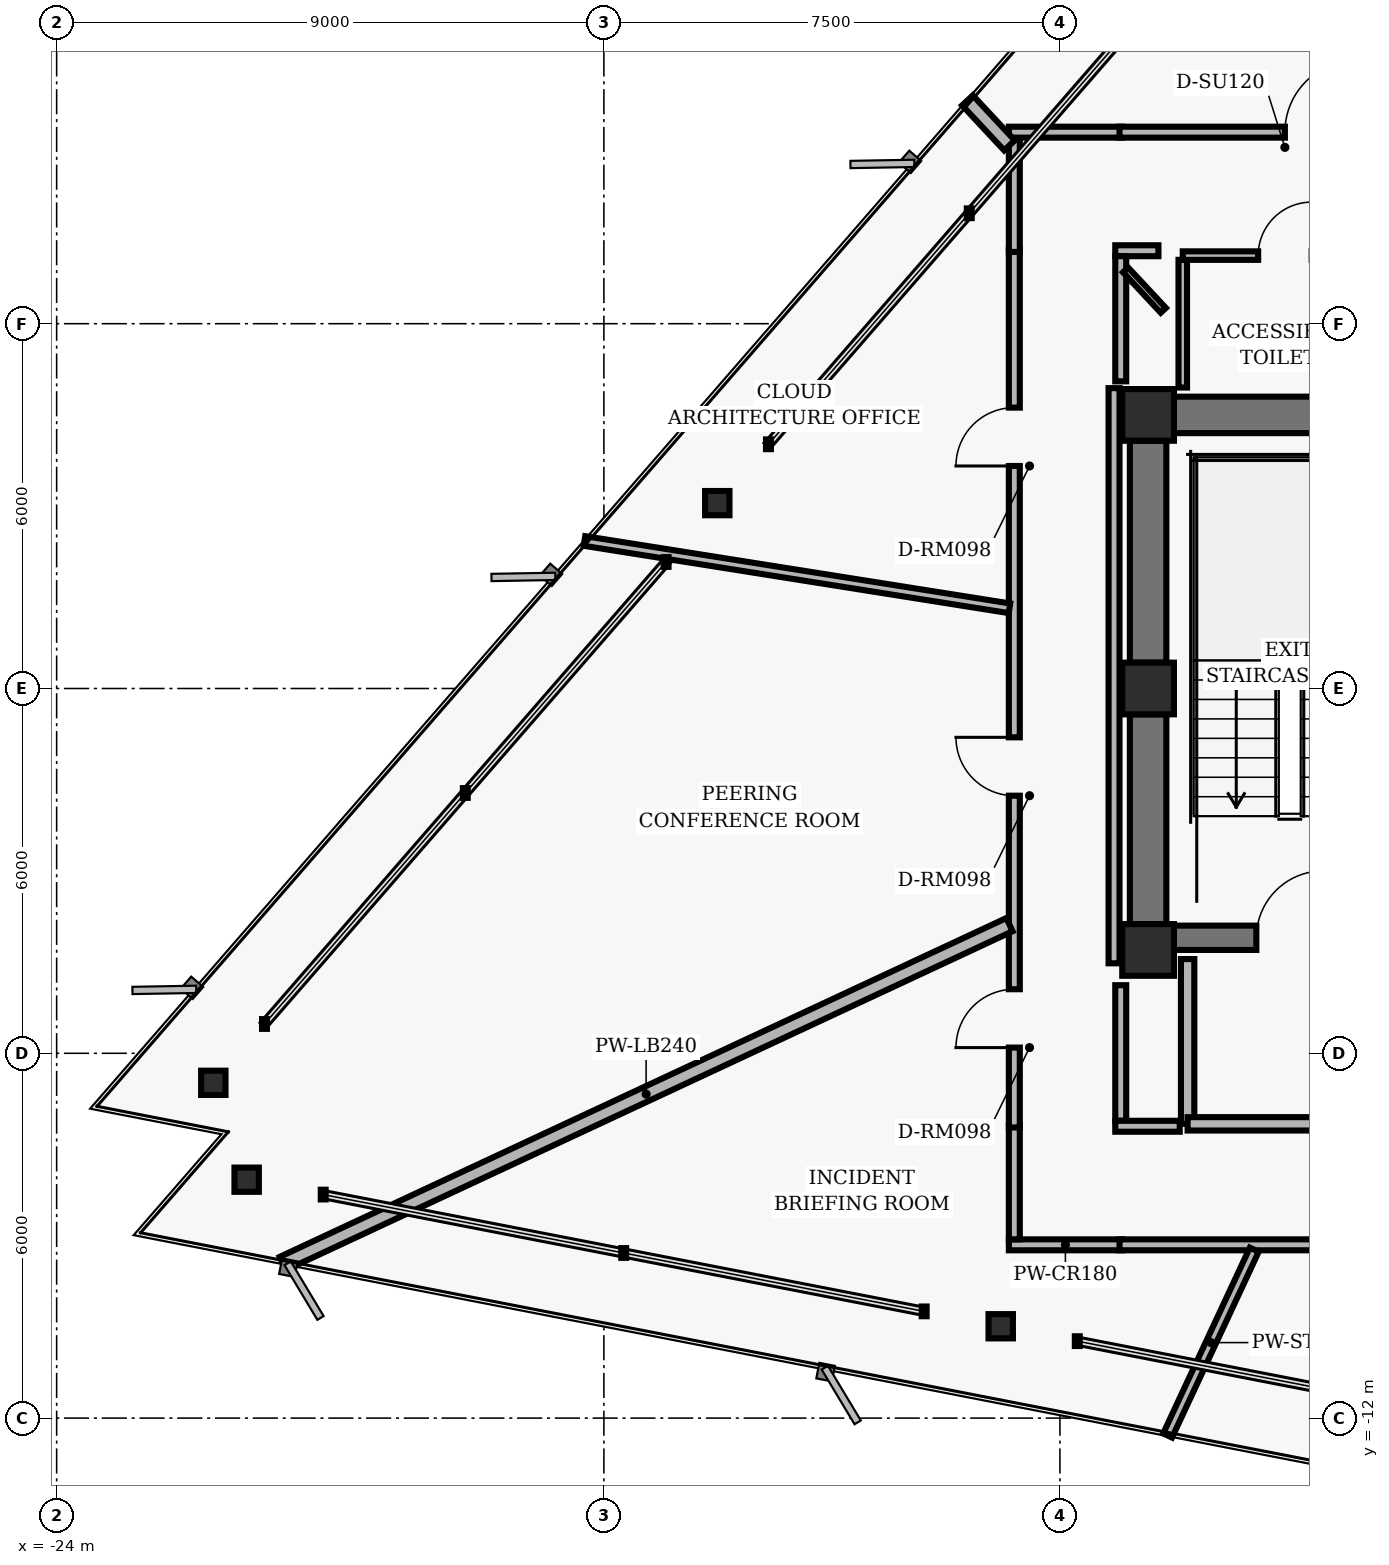
"""IFC4 building model, lengths in metres.
Left out: names, types, materials, properties, quantities, classifications, styles, units other than length and angle.
Written with IfcOpenShell. Run it as: python <this file> out.ifc"""

import sys

from ifc_helpers import new_model, si_unit, direction, frame, frame_2d, origin, origin_2d, place, context, subcontext, project, spatial, rectangle, hollow_rectangle, i_section, extrude, element, fill, save


model = new_model("IFC4")
c1 = context("Model", 3, precision=1e-05, world=origin(), true_north=direction((0.0, 1.0)))
c2 = subcontext(c1, "Body", "Model", "MODEL_VIEW")
j1 = project(units=[si_unit("LENGTHUNIT", "METRE"), si_unit("PLANEANGLEUNIT", "RADIAN")], contexts=[c1])
p1 = place(None, origin())
s1 = spatial("IfcSite", under=j1, at=p1, CompositionType="ELEMENT")
p2 = place(p1, origin())
s2 = spatial("IfcBuilding", under=s1, at=p2, CompositionType="ELEMENT")
p3 = place(p2, frame((0.0, 0.0, 156.32)))
s3 = spatial("IfcBuildingStorey", under=s2, at=p3, CompositionType="ELEMENT", Elevation=156.32)
for number, where, z_axis, x_axis in (
    (1, (-6.05, 4.5, 0.0), (0.0, 0.0, 1.0), (1.0, 0.0, 0.0)),
    (2, (-6.05, 0.0, 0.0), (0.0, 0.0, 1.0), (1.0, 0.0, 0.0)),
    (3, (-6.05, -4.3, 0.0), (0.0, 0.0, 1.0), (1.0, 0.0, 0.0)),
):
    element("IfcColumn", number, at=place(p3, frame(where, z_axis=z_axis, x_axis=x_axis)), inside=s3, PredefinedType="COLUMN", context=c2, shape_type="SweptSolid", body=[
        extrude(hollow_rectangle(XDim=0.85, YDim=0.85, WallThickness=0.055, InnerFilletRadius=0.02, OuterFilletRadius=0.04, at=origin_2d()), origin(), (0.0, 0.0, 1.0), 3.04),
    ])
p4 = place(p3, frame((-6.05, 0.425, 0.0), z_axis=(0.0, 0.0, 1.0), x_axis=(0.0, 1.0, 0.0)))
e4 = element("IfcWall", 4, at=p4, inside=s3, PredefinedType="SHEAR", context=c2, shape_type="SweptSolid", body=[
    extrude(rectangle(XDim=3.65, YDim=0.6, at=frame_2d((1.825, 0.0))), origin(), (0.0, 0.0, 1.0), 2.788),
])
p5 = place(p3, frame((-6.05, -3.875, 0.0), z_axis=(0.0, 0.0, 1.0), x_axis=(0.0, 1.0, 0.0)))
e5 = element("IfcWall", 5, at=p5, inside=s3, PredefinedType="SHEAR", context=c2, shape_type="SweptSolid", body=[
    extrude(rectangle(XDim=3.45, YDim=0.6, at=frame_2d((1.725, 0.0))), origin(), (0.0, 0.0, 1.0), 2.788),
])
p6 = place(p3, frame((-5.625, -4.1, 0.0), z_axis=(0.0, 0.0, 1.0), x_axis=(1.0, 0.0, 0.0)))
e6 = element("IfcWall", 6, at=p6, inside=s3, PredefinedType="SHEAR", context=c2, shape_type="SweptSolid", body=[
    extrude(rectangle(XDim=11.25, YDim=0.4, at=frame_2d((5.625, 0.0))), origin(), (0.0, 0.0, 1.0), 2.788),
])
p7 = place(p6, frame((1.355, 0.0, 0.0)))
e7 = element("IfcOpeningElement", 7, at=p7, cuts=e6, PredefinedType="OPENING", context=c2, shape_type="SweptSolid", body=[
    extrude(rectangle(XDim=1.1, YDim=2.04, at=frame_2d((0.55, 1.02))), frame((0.0, 0.21, 0.0), z_axis=(0.0, -1.0, 0.0), x_axis=(1.0, 0.0, 0.0)), (0.0, 0.0, 1.0), 0.42),
])
p8 = place(p6, frame((8.795, 0.0, 0.0)))
e8 = element("IfcOpeningElement", 8, at=p8, cuts=e6, PredefinedType="OPENING", context=c2, shape_type="SweptSolid", body=[
    extrude(rectangle(XDim=1.1, YDim=2.04, at=frame_2d((0.55, 1.02))), frame((0.0, 0.21, 0.0), z_axis=(0.0, -1.0, 0.0), x_axis=(1.0, 0.0, 0.0)), (0.0, 0.0, 1.0), 0.42),
])
p9 = place(p6, frame((4.095, 0.0, 0.0)))
e9 = element("IfcOpeningElement", 9, at=p9, cuts=e6, PredefinedType="OPENING", context=c2, shape_type="SweptSolid", body=[
    extrude(rectangle(XDim=1.06, YDim=2.04, at=frame_2d((0.53, 1.02))), frame((0.0, 0.21, 0.0), z_axis=(0.0, -1.0, 0.0), x_axis=(1.0, 0.0, 0.0)), (0.0, 0.0, 1.0), 0.42),
])
p10 = place(p6, frame((6.095, 0.0, 0.0)))
e10 = element("IfcOpeningElement", 10, at=p10, cuts=e6, PredefinedType="OPENING", context=c2, shape_type="SweptSolid", body=[
    extrude(rectangle(XDim=1.06, YDim=2.04, at=frame_2d((0.53, 1.02))), frame((0.0, 0.21, 0.0), z_axis=(0.0, -1.0, 0.0), x_axis=(1.0, 0.0, 0.0)), (0.0, 0.0, 1.0), 0.42),
])
p11 = place(p3, frame((-5.625, 4.5, 0.0), z_axis=(0.0, 0.0, 1.0), x_axis=(1.0, 0.0, 0.0)))
e11 = element("IfcWall", 11, at=p11, inside=s3, PredefinedType="SHEAR", context=c2, shape_type="SweptSolid", body=[
    extrude(rectangle(XDim=3.575, YDim=0.6, at=frame_2d((1.788, 0.0))), origin(), (0.0, 0.0, 1.0), 2.788),
])
for number, where, z_axis, x_axis in (
    (12, (-13.135, 3.049, 0.0), (0.0, 0.0, 1.0), (1.0, 0.0, 0.0)),
    (13, (-21.424, -6.486, 0.0), (0.0, 0.0, 1.0), (1.0, 0.0, 0.0)),
    (14, (-20.875, -8.079, 0.0), (0.0, 0.0, 1.0), (1.0, 0.0, 0.0)),
    (15, (-8.474, -10.49, 0.0), (0.0, 0.0, 1.0), (1.0, 0.0, 0.0)),
):
    element("IfcColumn", number, at=place(p3, frame(where, z_axis=z_axis, x_axis=x_axis)), inside=s3, PredefinedType="COLUMN", context=c2, shape_type="SweptSolid", body=[
        extrude(i_section(OverallWidth=0.401, OverallDepth=0.399, WebThickness=0.025, FlangeThickness=0.04, FilletRadius=0.018, at=origin_2d()), origin(), (0.0, 0.0, 1.0), 3.04),
    ])
p12 = place(p3, frame((-5.4, -7.16, 0.0), z_axis=(0.0, 0.0, 1.0), x_axis=(0.0, 1.0, 0.0)))
e16 = element("IfcWall", 16, at=p12, inside=s3, PredefinedType="PARTITIONING", context=c2, shape_type="SweptSolid", body=[
    extrude(rectangle(XDim=2.71, YDim=0.22, at=frame_2d((1.355, 0.0))), origin(), (0.0, 0.0, 1.0), 2.763),
])
p13 = place(p3, frame((-5.4, -7.16, 0.0), z_axis=(0.0, 0.0, 1.0), x_axis=(1.0, 0.0, 0.0)))
e17 = element("IfcWall", 17, at=p13, inside=s3, PredefinedType="PARTITIONING", context=c2, shape_type="SweptSolid", body=[
    extrude(rectangle(XDim=5.4, YDim=0.22, at=frame_2d((2.7, 0.0))), origin(), (0.0, 0.0, 1.0), 2.33),
])
p14 = place(p13, frame((2.05, 0.0, 0.0)))
e18 = element("IfcOpeningElement", 18, at=p14, cuts=e17, PredefinedType="OPENING", context=c2, shape_type="SweptSolid", body=[
    extrude(rectangle(XDim=1.12, YDim=2.02, at=frame_2d((0.56, 1.01))), frame((0.0, 0.12, 0.0), z_axis=(0.0, -1.0, 0.0), x_axis=(1.0, 0.0, 0.0)), (0.0, 0.0, 1.0), 0.24),
])
p15 = place(p3, frame((-5.48, 4.95, 0.0), z_axis=(0.0, 0.0, 1.0), x_axis=(0.0, 1.0, 0.0)))
e19 = element("IfcWall", 19, at=p15, inside=s3, PredefinedType="PARTITIONING", context=c2, shape_type="SweptSolid", body=[
    extrude(rectangle(XDim=2.1, YDim=0.14, at=frame_2d((1.05, 0.0))), origin(), (0.0, 0.0, 1.0), 2.763),
])
p16 = place(p3, frame((-5.48, 7.12, 0.0), z_axis=(0.0, 0.0, 1.0), x_axis=(1.0, 0.0, 0.0)))
e20 = element("IfcWall", 20, at=p16, inside=s3, PredefinedType="PARTITIONING", context=c2, shape_type="SweptSolid", body=[
    extrude(rectangle(XDim=3.36, YDim=0.14, at=frame_2d((1.68, 0.0))), origin(), (0.0, 0.0, 1.0), 2.763),
])
p17 = place(p16, frame((1.24, 0.0, 0.0)))
e21 = element("IfcOpeningElement", 21, at=p17, cuts=e20, PredefinedType="OPENING", context=c2, shape_type="SweptSolid", body=[
    extrude(rectangle(XDim=0.88, YDim=2.02, at=frame_2d((0.44, 1.01))), frame((0.0, 0.08, 0.0), z_axis=(0.0, -1.0, 0.0), x_axis=(1.0, 0.0, 0.0)), (0.0, 0.0, 1.0), 0.16),
])
p18 = place(p3, frame((-6.48, -9.15, 0.0), z_axis=(0.0, 0.0, 1.0), x_axis=(-1.0, 0.0, 0.0)))
e22 = element("IfcWall", 22, at=p18, inside=s3, PredefinedType="PARTITIONING", context=c2, shape_type="SweptSolid", body=[
    extrude(rectangle(XDim=1.86, YDim=0.18, at=frame_2d((0.93, 0.0))), origin(), (0.0, 0.0, 1.0), 2.33),
])
p19 = place(p3, frame((-8.25, -9.06, 0.0), z_axis=(0.0, 0.0, 1.0), x_axis=(0.0, 1.0, 0.0)))
e23 = element("IfcWall", 23, at=p19, inside=s3, PredefinedType="PARTITIONING", context=c2, shape_type="SweptSolid", body=[
    extrude(rectangle(XDim=1.88, YDim=0.18, at=frame_2d((0.94, 0.0))), origin(), (0.0, 0.0, 1.0), 2.763),
])
p20 = place(p3, frame((-8.25, -7.22, 0.0), z_axis=(0.0, 0.0, 1.0), x_axis=(0.0, 1.0, 0.0)))
e24 = element("IfcWall", 24, at=p20, inside=s3, PredefinedType="PARTITIONING", context=c2, shape_type="SweptSolid", body=[
    extrude(rectangle(XDim=14.44, YDim=0.18, at=frame_2d((7.22, 0.0))), origin(), (0.0, 0.0, 1.0), 2.763),
])
p21 = place(p20, frame((5.457, 0.0, 0.0)))
e25 = element("IfcOpeningElement", 25, at=p21, cuts=e24, PredefinedType="OPENING", context=c2, shape_type="SweptSolid", body=[
    extrude(rectangle(XDim=0.96, YDim=2.02, at=frame_2d((0.48, 1.01))), frame((0.0, 0.1, 0.0), z_axis=(0.0, -1.0, 0.0), x_axis=(1.0, 0.0, 0.0)), (0.0, 0.0, 1.0), 0.2),
])
p22 = place(p20, frame((1.314, 0.0, 0.0)))
e26 = element("IfcOpeningElement", 26, at=p22, cuts=e24, PredefinedType="OPENING", context=c2, shape_type="SweptSolid", body=[
    extrude(rectangle(XDim=0.96, YDim=2.02, at=frame_2d((0.48, 1.01))), frame((0.0, 0.1, 0.0), z_axis=(0.0, -1.0, 0.0), x_axis=(1.0, 0.0, 0.0)), (0.0, 0.0, 1.0), 0.2),
])
p23 = place(p20, frame((10.88, 0.0, 0.0)))
e27 = element("IfcOpeningElement", 27, at=p23, cuts=e24, PredefinedType="OPENING", context=c2, shape_type="SweptSolid", body=[
    extrude(rectangle(XDim=0.96, YDim=2.02, at=frame_2d((0.48, 1.01))), frame((0.0, 0.1, 0.0), z_axis=(0.0, -1.0, 0.0), x_axis=(1.0, 0.0, 0.0)), (0.0, 0.0, 1.0), 0.2),
])
p24 = place(p3, frame((-8.25, 7.18, 0.0), z_axis=(0.0, 0.0, 1.0), x_axis=(0.0, 1.0, 0.0)))
e28 = element("IfcWall", 28, at=p24, inside=s3, PredefinedType="PARTITIONING", context=c2, shape_type="SweptSolid", body=[
    extrude(rectangle(XDim=1.88, YDim=0.18, at=frame_2d((0.94, 0.0))), origin(), (0.0, 0.0, 1.0), 2.763),
])
p25 = place(p3, frame((-8.34, 9.15, 0.0), z_axis=(0.0, 0.0, 1.0), x_axis=(1.0, 0.0, 0.0)))
e29 = element("IfcWall", 29, at=p25, inside=s3, PredefinedType="PARTITIONING", context=c2, shape_type="SweptSolid", body=[
    extrude(rectangle(XDim=1.86, YDim=0.18, at=frame_2d((0.93, 0.0))), origin(), (0.0, 0.0, 1.0), 2.763),
])
p26 = place(p3, frame((-6.52, 9.15, 0.0), z_axis=(0.0, 0.0, 1.0), x_axis=(1.0, 0.0, 0.0)))
e30 = element("IfcWall", 30, at=p26, inside=s3, PredefinedType="PARTITIONING", context=c2, shape_type="SweptSolid", body=[
    extrude(rectangle(XDim=16.662, YDim=0.18, at=frame_2d((8.331, 0.0))), origin(), (0.0, 0.0, 1.0), 2.763),
])
p27 = place(p26, frame((9.985, 0.0, 0.0)))
e31 = element("IfcOpeningElement", 31, at=p27, cuts=e30, PredefinedType="OPENING", context=c2, shape_type="SweptSolid", body=[
    extrude(rectangle(XDim=0.96, YDim=2.02, at=frame_2d((0.48, 1.01))), frame((0.0, 0.1, 0.0), z_axis=(0.0, -1.0, 0.0), x_axis=(1.0, 0.0, 0.0)), (0.0, 0.0, 1.0), 0.2),
])
p28 = place(p26, frame((2.719, 0.0, 0.0)))
e32 = element("IfcOpeningElement", 32, at=p28, cuts=e30, PredefinedType="OPENING", context=c2, shape_type="SweptSolid", body=[
    extrude(rectangle(XDim=1.18, YDim=2.02, at=frame_2d((0.59, 1.01))), frame((0.0, 0.1, 0.0), z_axis=(0.0, -1.0, 0.0), x_axis=(1.0, 0.0, 0.0)), (0.0, 0.0, 1.0), 0.2),
])
p29 = place(p3, frame((-5.88, 7.2, 0.0), z_axis=(0.0, 0.0, 1.0), x_axis=(-1.0, 0.0, 0.0)))
e33 = element("IfcWall", 33, at=p29, inside=s3, PredefinedType="PARTITIONING", context=c2, shape_type="SweptSolid", body=[
    extrude(rectangle(XDim=0.71, YDim=0.18, at=frame_2d((0.355, 0.0))), origin(), (0.0, 0.0, 1.0), 2.763),
])
p30 = place(p3, frame((-6.5, 7.11, 0.0), z_axis=(0.0, 0.0, 1.0), x_axis=(0.0, -1.0, 0.0)))
e34 = element("IfcWall", 34, at=p30, inside=s3, PredefinedType="PARTITIONING", context=c2, shape_type="SweptSolid", body=[
    extrude(rectangle(XDim=2.058, YDim=0.18, at=frame_2d((1.029, 0.0))), origin(), (0.0, 0.0, 1.0), 2.763),
])
p31 = place(p3, frame((-6.61, 4.94, 0.0), z_axis=(0.0, 0.0, 1.0), x_axis=(0.0, -1.0, 0.0)))
e35 = element("IfcWall", 35, at=p31, inside=s3, PredefinedType="PARTITIONING", context=c2, shape_type="SweptSolid", body=[
    extrude(rectangle(XDim=9.46, YDim=0.18, at=frame_2d((4.73, 0.0))), origin(), (0.0, 0.0, 1.0), 2.763),
])
p32 = place(p3, frame((-6.5, -4.88, 0.0), z_axis=(0.0, 0.0, 1.0), x_axis=(0.0, -1.0, 0.0)))
e36 = element("IfcWall", 36, at=p32, inside=s3, PredefinedType="PARTITIONING", context=c2, shape_type="SweptSolid", body=[
    extrude(rectangle(XDim=2.23, YDim=0.18, at=frame_2d((1.115, 0.0))), origin(), (0.0, 0.0, 1.0), 2.763),
])
p33 = place(p3, frame((-6.59, -7.2, 0.0), z_axis=(0.0, 0.0, 1.0), x_axis=(1.0, 0.0, 0.0)))
e37 = element("IfcWall", 37, at=p33, inside=s3, PredefinedType="PARTITIONING", context=c2, shape_type="SweptSolid", body=[
    extrude(rectangle(XDim=1.06, YDim=0.18, at=frame_2d((0.53, 0.0))), origin(), (0.0, 0.0, 1.0), 2.763),
])
p34 = place(p3, frame((10.98, -9.15, 0.0), z_axis=(0.0, 0.0, 1.0), x_axis=(-1.0, 0.0, 0.0)))
e38 = element("IfcWall", 38, at=p34, inside=s3, PredefinedType="PARTITIONING", context=c2, shape_type="SweptSolid", body=[
    extrude(rectangle(XDim=17.5, YDim=0.18, at=frame_2d((8.75, 0.0))), origin(), (0.0, 0.0, 1.0), 2.33),
])
p35 = place(p34, frame((11.417, 0.0, 0.0)))
e39 = element("IfcOpeningElement", 39, at=p35, cuts=e38, PredefinedType="OPENING", context=c2, shape_type="SweptSolid", body=[
    extrude(rectangle(XDim=0.96, YDim=2.02, at=frame_2d((0.48, 1.01))), frame((0.0, 0.1, 0.0), z_axis=(0.0, -1.0, 0.0), x_axis=(1.0, 0.0, 0.0)), (0.0, 0.0, 1.0), 0.2),
])
p36 = place(p34, frame((3.872, 0.0, 0.0)))
e40 = element("IfcOpeningElement", 40, at=p36, cuts=e38, PredefinedType="OPENING", context=c2, shape_type="SweptSolid", body=[
    extrude(rectangle(XDim=1.02, YDim=2.02, at=frame_2d((0.51, 1.01))), frame((0.0, 0.1, 0.0), z_axis=(0.0, -1.0, 0.0), x_axis=(1.0, 0.0, 0.0)), (0.0, 0.0, 1.0), 0.2),
])
p37 = place(p3, frame((-8.33, -3.884, 0.0), z_axis=(0.0, 0.0, 1.0), x_axis=(-0.906301821786, -0.422631054026, 0.0)))
e41 = element("IfcWall", 41, at=p37, inside=s3, PredefinedType="PARTITIONING", context=c2, shape_type="SweptSolid", body=[
    extrude(rectangle(XDim=13.187, YDim=0.24, at=frame_2d((6.594, 0.0))), origin(), (0.0, 0.0, 1.0), 2.132),
])
p38 = place(p3, frame((-4.304, -9.23, 0.0), z_axis=(0.0, 0.0, 1.0), x_axis=(-0.422604032696, -0.906314422013, 0.0)))
e42 = element("IfcWall", 42, at=p38, inside=s3, PredefinedType="PARTITIONING", context=c2, shape_type="SweptSolid", body=[
    extrude(rectangle(XDim=3.372, YDim=0.16, at=frame_2d((1.686, 0.0))), origin(), (0.0, 0.0, 1.0), 2.763),
])
p39 = place(p3, frame((-5.8, 6.22, 0.0), z_axis=(0.0, 0.0, 1.0), x_axis=(-0.681964083565, 0.731385663469, 0.0)))
e43 = element("IfcWall", 43, at=p39, inside=s3, PredefinedType="MOVABLE", context=c2, shape_type="SweptSolid", body=[
    extrude(rectangle(XDim=0.909, YDim=0.115, at=frame_2d((0.455, 0.0))), origin(), (0.0, 0.0, 1.0), 2.763),
])
p40 = place(p3, frame((-8.33, 8.933, 0.0), z_axis=(0.0, 0.0, 1.0), x_axis=(-0.68206891796, 0.731287898952, 0.0)))
e44 = element("IfcWall", 44, at=p40, inside=s3, PredefinedType="PARTITIONING", context=c2, shape_type="SweptSolid", body=[
    extrude(rectangle(XDim=1.012, YDim=0.24, at=frame_2d((0.506, 0.0))), origin(), (0.0, 0.0, 1.0), 2.763),
])
p41 = place(p3, frame((-8.33, 1.319, 0.0), z_axis=(0.0, 0.0, 1.0), x_axis=(-0.987685078896, 0.156455057208, 0.0)))
e45 = element("IfcWall", 45, at=p41, inside=s3, PredefinedType="PARTITIONING", context=c2, shape_type="SweptSolid", body=[
    extrude(rectangle(XDim=7.077, YDim=0.16, at=frame_2d((3.538, 0.0))), origin(), (0.0, 0.0, 1.0), 2.763),
])
p42 = place(p7, origin())
e46 = element("IfcDoor", 46, at=p42, inside=s3, OperationType="SINGLE_SWING_RIGHT", PredefinedType="DOOR", context=c2, shape_type="SweptSolid", body=[
    extrude(rectangle(XDim=1.1, YDim=2.04, at=frame_2d((0.55, 1.02))), frame((0.0, 0.025, 0.0), z_axis=(0.0, -1.0, 0.0), x_axis=(1.0, 0.0, 0.0)), (0.0, 0.0, 1.0), 0.05),
])
fill(e7, e46)
p43 = place(p17, origin())
e47 = element("IfcDoor", 47, at=p43, inside=s3, OperationType="SINGLE_SWING_RIGHT", PredefinedType="DOOR", context=c2, shape_type="SweptSolid", body=[
    extrude(rectangle(XDim=0.88, YDim=2.02, at=frame_2d((0.44, 1.01))), frame((0.0, 0.025, 0.0), z_axis=(0.0, -1.0, 0.0), x_axis=(1.0, 0.0, 0.0)), (0.0, 0.0, 1.0), 0.05),
])
fill(e21, e47)
p44 = place(p21, origin())
e48 = element("IfcDoor", 48, at=p44, inside=s3, OperationType="SINGLE_SWING_RIGHT", PredefinedType="DOOR", context=c2, shape_type="SweptSolid", body=[
    extrude(rectangle(XDim=0.96, YDim=2.02, at=frame_2d((0.48, 1.01))), frame((0.0, 0.025, 0.0), z_axis=(0.0, -1.0, 0.0), x_axis=(1.0, 0.0, 0.0)), (0.0, 0.0, 1.0), 0.05),
])
fill(e25, e48)
p45 = place(p22, origin())
e49 = element("IfcDoor", 49, at=p45, inside=s3, OperationType="SINGLE_SWING_LEFT", PredefinedType="DOOR", context=c2, shape_type="SweptSolid", body=[
    extrude(rectangle(XDim=0.96, YDim=2.02, at=frame_2d((0.48, 1.01))), frame((0.0, 0.025, 0.0), z_axis=(0.0, -1.0, 0.0), x_axis=(1.0, 0.0, 0.0)), (0.0, 0.0, 1.0), 0.05),
])
fill(e26, e49)
p46 = place(p28, origin())
e50 = element("IfcDoor", 50, at=p46, inside=s3, OperationType="SINGLE_SWING_RIGHT", PredefinedType="DOOR", context=c2, shape_type="SweptSolid", body=[
    extrude(rectangle(XDim=1.18, YDim=2.02, at=frame_2d((0.59, 1.01))), frame((0.0, 0.025, 0.0), z_axis=(0.0, -1.0, 0.0), x_axis=(1.0, 0.0, 0.0)), (0.0, 0.0, 1.0), 0.05),
])
fill(e32, e50)
p47 = place(p23, origin())
e51 = element("IfcDoor", 51, at=p47, inside=s3, OperationType="SINGLE_SWING_LEFT", PredefinedType="DOOR", context=c2, shape_type="SweptSolid", body=[
    extrude(rectangle(XDim=0.96, YDim=2.02, at=frame_2d((0.48, 1.01))), frame((0.0, 0.025, 0.0), z_axis=(0.0, -1.0, 0.0), x_axis=(1.0, 0.0, 0.0)), (0.0, 0.0, 1.0), 0.05),
])
fill(e27, e51)
save(model, sys.argv[1])
